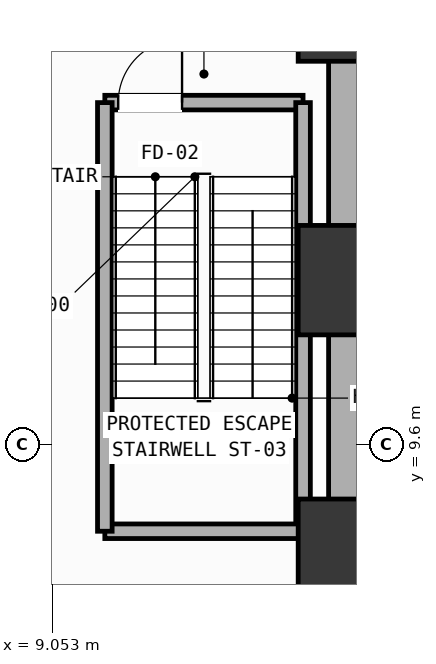
"""IFC4 building model, lengths in metres.
Left out: names, types, materials, properties, quantities, classifications, styles, units other than length and angle.
Written with IfcOpenShell. Run it as: python <this file> out.ifc"""

import sys

from ifc_helpers import new_model, si_unit, direction, frame, frame_2d, origin, origin_2d, place, context, subcontext, project, spatial, rectangle, extrude, element, fill, save


model = new_model("IFC4")
c1 = context("Model", 3, precision=1e-05, world=origin(), true_north=direction((0.0, 1.0)))
c2 = subcontext(c1, "Body", "Model", "MODEL_VIEW")
j1 = project(units=[si_unit("LENGTHUNIT", "METRE"), si_unit("PLANEANGLEUNIT", "RADIAN")], contexts=[c1])
p1 = place(None, origin())
s1 = spatial("IfcSite", under=j1, at=p1, CompositionType="ELEMENT")
p2 = place(p1, origin())
s2 = spatial("IfcBuilding", under=s1, at=p2, CompositionType="ELEMENT")
p3 = place(p2, frame((0.0, 0.0, -9.6)))
s3 = spatial("IfcBuildingStorey", under=s2, at=p3, CompositionType="ELEMENT", Elevation=-9.6)
for number, where, z_axis, x_axis in (
    (1, (14.0, 7.8, 0.0), (0.0, 0.0, 1.0), (1.0, 0.0, 0.0)),
    (2, (14.0, 12.3, 0.0), (0.0, 0.0, 1.0), (1.0, 0.0, 0.0)),
    (3, (14.0, 16.8, 0.0), (0.0, 0.0, 1.0), (1.0, 0.0, 0.0)),
):
    element("IfcColumn", number, at=place(p3, frame(where, z_axis=z_axis, x_axis=x_axis)), inside=s3, PredefinedType="COLUMN", context=c2, shape_type="SweptSolid", body=[
        extrude(rectangle(XDim=1.8, YDim=1.8, at=origin_2d()), origin(), (0.0, 0.0, 1.0), 4.8),
    ])
p4 = place(p3, frame((9.92, 15.22, 0.0), z_axis=(0.0, 0.0, 1.0), x_axis=(1.0, 0.0, 0.0)))
e4 = element("IfcWall", 4, at=p4, inside=s3, PredefinedType="SOLIDWALL", context=c2, shape_type="SweptSolid", body=[
    extrude(rectangle(XDim=3.26, YDim=0.24, at=frame_2d((1.63, 0.0))), origin(), (0.0, 0.0, 1.0), 4.55),
])
p5 = place(p4, frame((0.22, 0.0, 0.0)))
e5 = element("IfcOpeningElement", 5, at=p5, cuts=e4, PredefinedType="OPENING", context=c2, shape_type="SweptSolid", body=[
    extrude(rectangle(XDim=1.05, YDim=2.15, at=frame_2d((0.525, 1.075))), frame((0.0, 0.13, 0.0), z_axis=(0.0, -1.0, 0.0), x_axis=(1.0, 0.0, 0.0)), (0.0, 0.0, 1.0), 0.26),
])
p6 = place(p3, frame((13.18, 15.22, 0.0), z_axis=(0.0, 0.0, 1.0), x_axis=(0.0, -1.0, 0.0)))
e6 = element("IfcWall", 6, at=p6, inside=s3, PredefinedType="SOLIDWALL", context=c2, shape_type="SweptSolid", body=[
    extrude(rectangle(XDim=7.05, YDim=0.24, at=frame_2d((3.525, 0.0))), origin(), (0.0, 0.0, 1.0), 4.55),
])
p7 = place(p3, frame((13.18, 8.17, 0.0), z_axis=(0.0, 0.0, 1.0), x_axis=(-1.0, 0.0, 0.0)))
e7 = element("IfcWall", 7, at=p7, inside=s3, PredefinedType="SOLIDWALL", context=c2, shape_type="SweptSolid", body=[
    extrude(rectangle(XDim=3.26, YDim=0.24, at=frame_2d((1.63, 0.0))), origin(), (0.0, 0.0, 1.0), 4.55),
])
p8 = place(p3, frame((9.92, 8.17, 0.0), z_axis=(0.0, 0.0, 1.0), x_axis=(0.0, 1.0, 0.0)))
e8 = element("IfcWall", 8, at=p8, inside=s3, PredefinedType="SOLIDWALL", context=c2, shape_type="SweptSolid", body=[
    extrude(rectangle(XDim=7.05, YDim=0.24, at=frame_2d((3.525, 0.0))), origin(), (0.0, 0.0, 1.0), 4.55),
])
p9 = place(p3, frame((14.0, 7.8, 0.0), z_axis=(0.0, 0.0, 1.0), x_axis=(1.0, 0.0, 0.0)))
e9 = element("IfcWall", 9, at=p9, inside=s3, PredefinedType="SHEAR", context=c2, shape_type="SweptSolid", body=[
    extrude(rectangle(XDim=10.8, YDim=0.8, at=frame_2d((5.4, 0.0))), origin(), (0.0, 0.0, 1.0), 4.55),
])
p10 = place(p3, frame((14.0, 16.8, 0.0), z_axis=(0.0, 0.0, 1.0), x_axis=(0.0, -1.0, 0.0)))
e10 = element("IfcWall", 10, at=p10, inside=s3, PredefinedType="SHEAR", context=c2, shape_type="SweptSolid", body=[
    extrude(rectangle(XDim=9.0, YDim=0.8, at=frame_2d((4.5, 0.0))), origin(), (0.0, 0.0, 1.0), 4.55),
])
p11 = place(p3, frame((13.92, 5.0, 0.0), z_axis=(0.0, 0.0, 1.0), x_axis=(0.0, 1.0, 0.0)))
e11 = element("IfcWall", 11, at=p11, inside=s3, PredefinedType="PARTITIONING", context=c2, shape_type="SweptSolid", body=[
    extrude(rectangle(XDim=2.35, YDim=0.18, at=frame_2d((1.175, 0.0))), origin(), (0.0, 0.0, 1.0), 4.55),
])
p12 = place(p5, origin())
e12 = element("IfcDoor", 12, at=p12, inside=s3, OperationType="SINGLE_SWING_RIGHT", PredefinedType="DOOR", context=c2, shape_type="SweptSolid", body=[
    extrude(rectangle(XDim=1.05, YDim=2.15, at=frame_2d((0.525, 1.075))), frame((0.0, 0.025, 0.0), z_axis=(0.0, -1.0, 0.0), x_axis=(1.0, 0.0, 0.0)), (0.0, 0.0, 1.0), 0.05),
])
fill(e5, e12)
save(model, sys.argv[1])
